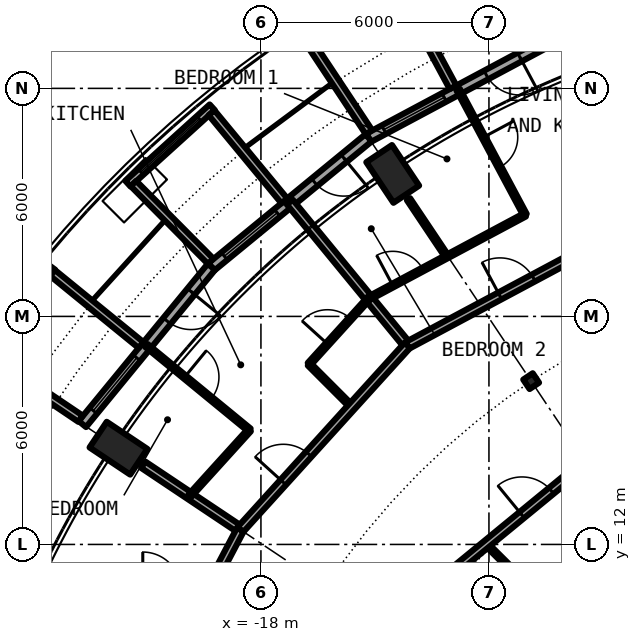
"""IFC4 building model, lengths in metres.
Left out: names, types, materials, properties, quantities, classifications, styles, units other than length and angle.
Written with IfcOpenShell. Run it as: python <this file> out.ifc"""

import sys

from ifc_helpers import new_model, si_unit, direction, frame, frame_2d, origin, origin_2d, place, context, subcontext, project, spatial, rectangle, circle, hollow_circle, i_section, extrude, element, fill, save


model = new_model("IFC4")
c1 = context("Model", 3, precision=1e-05, world=origin(), true_north=direction((0.0, 1.0)))
c2 = subcontext(c1, "Body", "Model", "MODEL_VIEW")
j1 = project(units=[si_unit("LENGTHUNIT", "METRE"), si_unit("PLANEANGLEUNIT", "RADIAN")], contexts=[c1])
p1 = place(None, origin())
s1 = spatial("IfcSite", under=j1, at=p1, CompositionType="ELEMENT")
p2 = place(p1, origin())
s2 = spatial("IfcBuilding", under=s1, at=p2, CompositionType="ELEMENT")
p3 = place(p2, frame((0.0, 0.0, 234.05)))
s3 = spatial("IfcBuildingStorey", under=s2, at=p3, CompositionType="ELEMENT", Elevation=234.05)
for number, where, z_axis, x_axis in (
    (1, (-14.889, 22.283, 0.0), (0.232, -0.347, 0.909), (0.831, 0.556, 0.0)),
    (2, (-22.283, 14.889, 0.0), (0.347, -0.232, 0.909), (0.556, 0.831, 0.0)),
):
    element("IfcColumn", number, at=place(p3, frame(where, z_axis=z_axis, x_axis=x_axis)), inside=s3, PredefinedType="COLUMN", context=c2, shape_type="SweptSolid", body=[
        extrude(hollow_circle(Radius=0.406, WallThickness=0.03, at=origin_2d()), origin(), (0.0, 0.0, 1.0), 3.081),
    ])
p4 = place(p3, frame((-10.889, 16.297, 0.0), z_axis=(0.0, 0.0, 1.0), x_axis=(-0.55557023302, 0.831469612303, 0.0)))
e3 = element("IfcColumn", 3, at=p4, inside=s3, PredefinedType="COLUMN", context=c2, shape_type="SweptSolid", body=[
    extrude(i_section(OverallWidth=0.3, OverallDepth=0.3, WebThickness=0.011, FlangeThickness=0.019, FilletRadius=0.027, at=origin_2d()), origin(), (0.0, 0.0, 1.0), 3.05),
])
p5 = place(p3, frame((-10.447, 25.222, 0.0), z_axis=(0.0, 0.0, 1.0), x_axis=(-0.881915646801, -0.471407246368, 0.0)))
e4 = element("IfcWall", 4, at=p5, inside=s3, PredefinedType="SOLIDWALL", context=c2, shape_type="SweptSolid", body=[
    extrude(rectangle(XDim=5.352, YDim=0.25, at=frame_2d((2.676, 0.0))), origin(), (0.0, 0.0, 1.0), 2.7),
])
p6 = place(p5, frame((0.841, 0.0, 0.0)))
e5 = element("IfcOpeningElement", 5, at=p6, cuts=e4, PredefinedType="OPENING", context=c2, shape_type="SweptSolid", body=[
    extrude(rectangle(XDim=1.0, YDim=2.2, at=frame_2d((0.5, 1.1))), frame((0.0, 0.135, 0.0), z_axis=(0.0, -1.0, 0.0), x_axis=(1.0, 0.0, 0.0)), (0.0, 0.0, 1.0), 0.27),
])
p7 = place(p5, frame((3.096, 0.0, 0.3)))
e6 = element("IfcOpeningElement", 6, at=p7, cuts=e4, PredefinedType="OPENING", context=c2, shape_type="SweptSolid", body=[
    extrude(rectangle(XDim=1.8, YDim=2.1, at=frame_2d((0.9, 1.05))), frame((0.0, 0.135, 0.0), z_axis=(0.0, -1.0, 0.0), x_axis=(1.0, 0.0, 0.0)), (0.0, 0.0, 1.0), 0.27),
])
p8 = place(p3, frame((-12.945, 24.029, -0.03), z_axis=(0.0, 0.0, 1.0), x_axis=(-0.474424310775, 0.88029629861, 0.0)))
e7 = element("IfcWall", 7, at=p8, inside=s3, PredefinedType="SOLIDWALL", context=c2, shape_type="SweptSolid", body=[
    extrude(rectangle(XDim=3.006, YDim=0.2, at=frame_2d((1.503, 0.0))), origin(), (0.0, 0.0, 1.0), 2.73),
])
p9 = place(p3, frame((-15.157, 22.846, -0.03), z_axis=(0.0, 0.0, 1.0), x_axis=(-0.552529231086, 0.833493520548, 0.0)))
e8 = element("IfcWall", 8, at=p9, inside=s3, PredefinedType="SOLIDWALL", context=c2, shape_type="SweptSolid", body=[
    extrude(rectangle(XDim=2.883, YDim=0.2, at=frame_2d((1.441, 0.0))), origin(), (0.0, 0.0, 1.0), 2.73),
])
p10 = place(p3, frame((-15.167, 22.699, 0.0), z_axis=(0.0, 0.0, 1.0), x_axis=(-0.773019449054, -0.634382322723, 0.0)))
e9 = element("IfcWall", 9, at=p10, inside=s3, PredefinedType="SOLIDWALL", context=c2, shape_type="SweptSolid", body=[
    extrude(rectangle(XDim=5.352, YDim=0.25, at=frame_2d((2.676, 0.0))), origin(), (0.0, 0.0, 1.0), 2.7),
])
p11 = place(p10, frame((0.841, 0.0, 0.0)))
e10 = element("IfcOpeningElement", 10, at=p11, cuts=e9, PredefinedType="OPENING", context=c2, shape_type="SweptSolid", body=[
    extrude(rectangle(XDim=1.0, YDim=2.2, at=frame_2d((0.5, 1.1))), frame((0.0, 0.135, 0.0), z_axis=(0.0, -1.0, 0.0), x_axis=(1.0, 0.0, 0.0)), (0.0, 0.0, 1.0), 0.27),
])
p12 = place(p10, frame((3.111, 0.0, 0.3)))
e11 = element("IfcOpeningElement", 11, at=p12, cuts=e9, PredefinedType="OPENING", context=c2, shape_type="SweptSolid", body=[
    extrude(rectangle(XDim=1.8, YDim=2.1, at=frame_2d((0.9, 1.05))), frame((0.0, 0.135, 0.0), z_axis=(0.0, -1.0, 0.0), x_axis=(1.0, 0.0, 0.0)), (0.0, 0.0, 1.0), 0.27),
])
p13 = place(p3, frame((-19.282, 23.503, -0.03), z_axis=(0.0, 0.0, 1.0), x_axis=(-0.740998365753, -0.671506829416, 0.0)))
e12 = element("IfcWall", 12, at=p13, inside=s3, PredefinedType="SOLIDWALL", context=c2, shape_type="SweptSolid", body=[
    extrude(rectangle(XDim=2.993, YDim=0.2, at=frame_2d((1.497, 0.0))), origin(), (0.0, 0.0, 1.0), 2.73),
])
p14 = place(p13, frame((0.457, 0.0, 0.33)))
e13 = element("IfcOpeningElement", 13, at=p14, cuts=e12, PredefinedType="OPENING", context=c2, shape_type="SweptSolid", body=[
    extrude(circle(Radius=1.04, at=frame_2d((1.04, 1.04))), frame((0.0, 0.11, 0.0), z_axis=(0.0, -1.0, 0.0), x_axis=(1.0, 0.0, 0.0)), (0.0, 0.0, 1.0), 0.22),
])
p15 = place(p3, frame((-17.384, 21.041, -0.03), z_axis=(0.0, 0.0, 1.0), x_axis=(-0.63709551667, 0.770784861449, 0.0)))
e14 = element("IfcWall", 14, at=p15, inside=s3, PredefinedType="SOLIDWALL", context=c2, shape_type="SweptSolid", body=[
    extrude(rectangle(XDim=3.006, YDim=0.2, at=frame_2d((1.503, 0.0))), origin(), (0.0, 0.0, 1.0), 2.73),
])
p16 = place(p3, frame((-19.323, 19.45, -0.03), z_axis=(0.0, 0.0, 1.0), x_axis=(-0.704476739375, 0.709727076896, 0.0)))
e15 = element("IfcWall", 15, at=p16, inside=s3, PredefinedType="SOLIDWALL", context=c2, shape_type="SweptSolid", body=[
    extrude(rectangle(XDim=2.883, YDim=0.2, at=frame_2d((1.441, 0.0))), origin(), (0.0, 0.0, 1.0), 2.73),
])
p17 = place(p3, frame((-19.304, 19.304, 0.0), z_axis=(0.0, 0.0, 1.0), x_axis=(-0.634382322723, -0.773019449054, 0.0)))
e16 = element("IfcWall", 16, at=p17, inside=s3, PredefinedType="SOLIDWALL", context=c2, shape_type="SweptSolid", body=[
    extrude(rectangle(XDim=5.352, YDim=0.25, at=frame_2d((2.676, 0.0))), origin(), (0.0, 0.0, 1.0), 2.7),
])
p18 = place(p17, frame((0.841, 0.0, 0.0)))
e17 = element("IfcOpeningElement", 17, at=p18, cuts=e16, PredefinedType="OPENING", context=c2, shape_type="SweptSolid", body=[
    extrude(rectangle(XDim=1.0, YDim=2.2, at=frame_2d((0.5, 1.1))), frame((0.0, 0.135, 0.0), z_axis=(0.0, -1.0, 0.0), x_axis=(1.0, 0.0, 0.0)), (0.0, 0.0, 1.0), 0.27),
])
p19 = place(p17, frame((3.096, 0.0, 0.3)))
e18 = element("IfcOpeningElement", 18, at=p19, cuts=e16, PredefinedType="OPENING", context=c2, shape_type="SweptSolid", body=[
    extrude(rectangle(XDim=1.8, YDim=2.1, at=frame_2d((0.9, 1.05))), frame((0.0, 0.135, 0.0), z_axis=(0.0, -1.0, 0.0), x_axis=(1.0, 0.0, 0.0)), (0.0, 0.0, 1.0), 0.27),
])
p20 = place(p3, frame((-23.496, 19.289, -0.03), z_axis=(0.0, 0.0, 1.0), x_axis=(-0.595908005124, -0.803052706508, 0.0)))
e19 = element("IfcWall", 19, at=p20, inside=s3, PredefinedType="SOLIDWALL", context=c2, shape_type="SweptSolid", body=[
    extrude(rectangle(XDim=2.994, YDim=0.2, at=frame_2d((1.497, 0.0))), origin(), (0.0, 0.0, 1.0), 2.73),
])
p21 = place(p20, frame((0.457, 0.0, 0.33)))
e20 = element("IfcOpeningElement", 20, at=p21, cuts=e19, PredefinedType="OPENING", context=c2, shape_type="SweptSolid", body=[
    extrude(circle(Radius=1.04, at=frame_2d((1.04, 1.04))), frame((0.0, 0.11, 0.0), z_axis=(0.0, -1.0, 0.0), x_axis=(1.0, 0.0, 0.0)), (0.0, 0.0, 1.0), 0.22),
])
p22 = place(p3, frame((-21.155, 17.246, -0.03), z_axis=(0.0, 0.0, 1.0), x_axis=(-0.775338113639, 0.631546363729, 0.0)))
e21 = element("IfcWall", 21, at=p22, inside=s3, PredefinedType="SOLIDWALL", context=c2, shape_type="SweptSolid", body=[
    extrude(rectangle(XDim=3.005, YDim=0.2, at=frame_2d((1.502, 0.0))), origin(), (0.0, 0.0, 1.0), 2.73),
])
p23 = place(p3, frame((-22.746, 15.307, -0.03), z_axis=(0.0, 0.0, 1.0), x_axis=(-0.829448139117, 0.558583730979, 0.0)))
e22 = element("IfcWall", 22, at=p23, inside=s3, PredefinedType="SOLIDWALL", context=c2, shape_type="SweptSolid", body=[
    extrude(rectangle(XDim=2.883, YDim=0.2, at=frame_2d((1.441, 0.0))), origin(), (0.0, 0.0, 1.0), 2.73),
])
p24 = place(p3, frame((-21.097, 14.097, 0.0), z_axis=(0.0, 0.0, 1.0), x_axis=(0.831340764735, -0.555763018642, 0.0)))
e23 = element("IfcWall", 23, at=p24, inside=s3, PredefinedType="PARTITIONING", context=c2, shape_type="SweptSolid", body=[
    extrude(rectangle(XDim=3.073, YDim=0.2, at=frame_2d((1.537, 0.0))), origin(), (0.0, 0.0, 1.0), 2.7),
])
p25 = place(p3, frame((-21.012, 17.233, 0.0), z_axis=(0.0, 0.0, 1.0), x_axis=(0.773165322764, -0.634204528267, 0.0)))
e24 = element("IfcWall", 24, at=p25, inside=s3, PredefinedType="PARTITIONING", context=c2, shape_type="SweptSolid", body=[
    extrude(rectangle(XDim=3.505, YDim=0.1, at=frame_2d((1.752, 0.0))), origin(), (0.0, 0.0, 1.0), 2.7),
])
p26 = place(p25, frame((1.303, 0.0, 0.0)))
e25 = element("IfcOpeningElement", 25, at=p26, cuts=e24, PredefinedType="OPENING", context=c2, shape_type="SweptSolid", body=[
    extrude(rectangle(XDim=0.9, YDim=2.3, at=frame_2d((0.45, 1.15))), frame((0.0, 0.06, 0.0), z_axis=(0.0, -1.0, 0.0), x_axis=(1.0, 0.0, 0.0)), (0.0, 0.0, 1.0), 0.12),
])
p27 = place(p3, frame((-17.24, 21.007, 0.0), z_axis=(0.0, 0.0, 1.0), x_axis=(0.634374159378, -0.773026148273, 0.0)))
e26 = element("IfcWall", 26, at=p27, inside=s3, PredefinedType="PARTITIONING", context=c2, shape_type="SweptSolid", body=[
    extrude(rectangle(XDim=4.876, YDim=0.2, at=frame_2d((2.438, 0.0))), origin(), (0.0, 0.0, 1.0), 2.7),
])
p28 = place(p3, frame((-16.732, 16.743, 0.0), z_axis=(0.0, 0.0, 1.0), x_axis=(0.70679853939, -0.707414888673, 0.0)))
e27 = element("IfcWall", 27, at=p28, inside=s3, PredefinedType="PARTITIONING", context=c2, shape_type="SweptSolid", body=[
    extrude(rectangle(XDim=1.584, YDim=0.1, at=frame_2d((0.792, 0.0))), origin(), (0.0, 0.0, 1.0), 2.7),
])
p29 = place(p3, frame((-14.117, 21.084, 0.0), z_axis=(0.0, 0.0, 1.0), x_axis=(0.556342315305, -0.830953204579, 0.0)))
e28 = element("IfcWall", 28, at=p29, inside=s3, PredefinedType="PARTITIONING", context=c2, shape_type="SweptSolid", body=[
    extrude(rectangle(XDim=1.817, YDim=0.1, at=frame_2d((0.909, 0.0))), origin(), (0.0, 0.0, 1.0), 2.7),
])
p30 = place(p3, frame((-12.81, 23.966, 0.0), z_axis=(0.0, 0.0, 1.0), x_axis=(0.471372010014, -0.881934480659, 0.0)))
e29 = element("IfcWall", 29, at=p30, inside=s3, PredefinedType="PARTITIONING", context=c2, shape_type="SweptSolid", body=[
    extrude(rectangle(XDim=3.734, YDim=0.1, at=frame_2d((1.867, 0.0))), origin(), (0.0, 0.0, 1.0), 2.7),
])
p31 = place(p30, frame((1.417, 0.0, 0.0)))
e30 = element("IfcOpeningElement", 30, at=p31, cuts=e29, PredefinedType="OPENING", context=c2, shape_type="SweptSolid", body=[
    extrude(rectangle(XDim=0.9, YDim=2.3, at=frame_2d((0.45, 1.15))), frame((0.0, 0.06, 0.0), z_axis=(0.0, -1.0, 0.0), x_axis=(1.0, 0.0, 0.0)), (0.0, 0.0, 1.0), 0.12),
])
p32 = place(p3, frame((-12.069, 12.007, 0.0), z_axis=(0.0, 0.0, 1.0), x_axis=(0.708851268309, -0.705357979622, 0.0)))
e31 = element("IfcWall", 31, at=p32, inside=s3, PredefinedType="PARTITIONING", context=c2, shape_type="SweptSolid", body=[
    extrude(rectangle(XDim=4.263, YDim=0.1, at=frame_2d((2.132, 0.0))), origin(), (0.0, 0.0, 1.0), 2.7),
])
p33 = place(p32, frame((1.682, 0.0, 0.0)))
e32 = element("IfcOpeningElement", 32, at=p33, cuts=e31, PredefinedType="OPENING", context=c2, shape_type="SweptSolid", body=[
    extrude(rectangle(XDim=0.9, YDim=2.3, at=frame_2d((0.45, 1.15))), frame((0.0, 0.06, 0.0), z_axis=(0.0, -1.0, 0.0), x_axis=(1.0, 0.0, 0.0)), (0.0, 0.0, 1.0), 0.12),
])
p34 = place(p3, frame((-14.717, 9.834, 0.0), z_axis=(0.0, 0.0, 1.0), x_axis=(0.773034536097, 0.634363938131, 0.0)))
e33 = element("IfcWall", 33, at=p34, inside=s3, PredefinedType="PARTITIONING", context=c2, shape_type="SweptSolid", body=[
    extrude(rectangle(XDim=10.277, YDim=0.2, at=frame_2d((5.138, 0.0))), origin(), (0.0, 0.0, 1.0), 2.7),
])
p35 = place(p34, frame((4.638, 0.0, 0.0)))
e34 = element("IfcOpeningElement", 34, at=p35, cuts=e33, PredefinedType="OPENING", context=c2, shape_type="SweptSolid", body=[
    extrude(rectangle(XDim=1.0, YDim=2.3, at=frame_2d((0.5, 1.15))), frame((0.0, 0.11, 0.0), z_axis=(0.0, -1.0, 0.0), x_axis=(1.0, 0.0, 0.0)), (0.0, 0.0, 1.0), 0.22),
])
p36 = place(p3, frame((-14.149, 17.236, 0.0), z_axis=(0.0, 0.0, 1.0), x_axis=(0.881869539497, 0.471493494448, 0.0)))
e35 = element("IfcWall", 35, at=p36, inside=s3, PredefinedType="PARTITIONING", context=c2, shape_type="SweptSolid", body=[
    extrude(rectangle(XDim=8.704, YDim=0.2, at=frame_2d((4.352, 0.0))), origin(), (0.0, 0.0, 1.0), 2.7),
])
p37 = place(p36, frame((2.765, 0.0, 0.0)))
e36 = element("IfcOpeningElement", 36, at=p37, cuts=e35, PredefinedType="OPENING", context=c2, shape_type="SweptSolid", body=[
    extrude(rectangle(XDim=1.0, YDim=2.3, at=frame_2d((0.5, 1.15))), frame((0.0, 0.11, 0.0), z_axis=(0.0, -1.0, 0.0), x_axis=(1.0, 0.0, 0.0)), (0.0, 0.0, 1.0), 0.22),
])
p38 = place(p3, frame((-18.542, 12.389, 0.0), z_axis=(0.0, 0.0, 1.0), x_axis=(0.671561669125, 0.740948665268, 0.0)))
e37 = element("IfcWall", 37, at=p38, inside=s3, PredefinedType="PARTITIONING", context=c2, shape_type="SweptSolid", body=[
    extrude(rectangle(XDim=6.544, YDim=0.2, at=frame_2d((3.272, 0.0))), origin(), (0.0, 0.0, 1.0), 2.7),
])
p39 = place(p38, frame((1.682, 0.0, 0.0)))
e38 = element("IfcOpeningElement", 38, at=p39, cuts=e37, PredefinedType="OPENING", context=c2, shape_type="SweptSolid", body=[
    extrude(rectangle(XDim=1.0, YDim=2.3, at=frame_2d((0.5, 1.15))), frame((0.0, 0.11, 0.0), z_axis=(0.0, -1.0, 0.0), x_axis=(1.0, 0.0, 0.0)), (0.0, 0.0, 1.0), 0.22),
])
p40 = place(p3, frame((-19.328, 10.896, 0.0), z_axis=(0.0, 0.0, 1.0), x_axis=(0.465812036273, 0.88488369115, 0.0)))
e39 = element("IfcWall", 39, at=p40, inside=s3, PredefinedType="PARTITIONING", context=c2, shape_type="SweptSolid", body=[
    extrude(rectangle(XDim=1.687, YDim=0.2, at=frame_2d((0.844, 0.0))), origin(), (0.0, 0.0, 1.0), 2.7),
])
p41 = place(p3, frame((-15.162, 18.475, 0.0), z_axis=(0.0, 0.0, 1.0), x_axis=(0.881916280728, 0.471406060405, 0.0)))
e40 = element("IfcWall", 40, at=p41, inside=s3, PredefinedType="PARTITIONING", context=c2, shape_type="SweptSolid", body=[
    extrude(rectangle(XDim=4.663, YDim=0.1, at=frame_2d((2.331, 0.0))), origin(), (0.0, 0.0, 1.0), 2.7),
])
p42 = place(p41, frame((0.716, 0.0, 0.0)))
e41 = element("IfcOpeningElement", 41, at=p42, cuts=e40, PredefinedType="OPENING", context=c2, shape_type="SweptSolid", body=[
    extrude(rectangle(XDim=0.9, YDim=2.3, at=frame_2d((0.45, 1.15))), frame((0.0, 0.06, 0.0), z_axis=(0.0, -1.0, 0.0), x_axis=(1.0, 0.0, 0.0)), (0.0, 0.0, 1.0), 0.12),
])
p43 = place(p3, frame((-19.872, 13.278, 0.0), z_axis=(0.0, 0.0, 1.0), x_axis=(0.671637685376, 0.740879760544, 0.0)))
e42 = element("IfcWall", 42, at=p43, inside=s3, PredefinedType="PARTITIONING", context=c2, shape_type="SweptSolid", body=[
    extrude(rectangle(XDim=2.338, YDim=0.1, at=frame_2d((1.169, 0.0))), origin(), (0.0, 0.0, 1.0), 2.7),
])
p44 = place(p3, frame((-16.732, 16.743, 0.0), z_axis=(0.0, 0.0, 1.0), x_axis=(0.671528384412, 0.740978831634, 0.0)))
e43 = element("IfcWall", 43, at=p44, inside=s3, PredefinedType="PARTITIONING", context=c2, shape_type="SweptSolid", body=[
    extrude(rectangle(XDim=2.338, YDim=0.1, at=frame_2d((1.169, 0.0))), origin(), (0.0, 0.0, 1.0), 2.7),
])
p45 = place(p44, frame((0.719, 0.0, 0.0)))
e44 = element("IfcOpeningElement", 44, at=p45, cuts=e43, PredefinedType="OPENING", context=c2, shape_type="SweptSolid", body=[
    extrude(rectangle(XDim=0.9, YDim=2.3, at=frame_2d((0.45, 1.15))), frame((0.0, 0.06, 0.0), z_axis=(0.0, -1.0, 0.0), x_axis=(1.0, 0.0, 0.0)), (0.0, 0.0, 1.0), 0.12),
])
p46 = place(p6, origin())
e45 = element("IfcDoor", 45, at=p46, inside=s3, OperationType="SINGLE_SWING_LEFT", PredefinedType="DOOR", context=c2, shape_type="SweptSolid", body=[
    extrude(rectangle(XDim=1.0, YDim=2.2, at=frame_2d((0.5, 1.1))), frame((0.0, 0.025, 0.0), z_axis=(0.0, -1.0, 0.0), x_axis=(1.0, 0.0, 0.0)), (0.0, 0.0, 1.0), 0.05),
])
fill(e5, e45)
p47 = place(p7, origin())
e46 = element("IfcWindow", 46, at=p47, inside=s3, PartitioningType="SINGLE_PANEL", PredefinedType="WINDOW", context=c2, shape_type="SweptSolid", body=[
    extrude(rectangle(XDim=1.8, YDim=2.1, at=frame_2d((0.9, 1.05))), frame((0.0, 0.03, 0.0), z_axis=(0.0, -1.0, 0.0), x_axis=(1.0, 0.0, 0.0)), (0.0, 0.0, 1.0), 0.06),
])
fill(e6, e46)
p48 = place(p11, origin())
e47 = element("IfcDoor", 47, at=p48, inside=s3, OperationType="SINGLE_SWING_LEFT", PredefinedType="DOOR", context=c2, shape_type="SweptSolid", body=[
    extrude(rectangle(XDim=1.0, YDim=2.2, at=frame_2d((0.5, 1.1))), frame((0.0, 0.025, 0.0), z_axis=(0.0, -1.0, 0.0), x_axis=(1.0, 0.0, 0.0)), (0.0, 0.0, 1.0), 0.05),
])
fill(e10, e47)
p49 = place(p12, origin())
e48 = element("IfcWindow", 48, at=p49, inside=s3, PartitioningType="SINGLE_PANEL", PredefinedType="WINDOW", context=c2, shape_type="SweptSolid", body=[
    extrude(rectangle(XDim=1.8, YDim=2.1, at=frame_2d((0.9, 1.05))), frame((0.0, 0.03, 0.0), z_axis=(0.0, -1.0, 0.0), x_axis=(1.0, 0.0, 0.0)), (0.0, 0.0, 1.0), 0.06),
])
fill(e11, e48)
p50 = place(p14, origin())
e49 = element("IfcWindow", 49, at=p50, inside=s3, PartitioningType="SINGLE_PANEL", PredefinedType="WINDOW", context=c2, shape_type="SweptSolid", body=[
    extrude(circle(Radius=1.04, at=frame_2d((1.04, 1.04))), frame((0.0, 0.03, 0.0), z_axis=(0.0, -1.0, 0.0), x_axis=(1.0, 0.0, 0.0)), (0.0, 0.0, 1.0), 0.06),
])
fill(e13, e49)
p51 = place(p18, origin())
e50 = element("IfcDoor", 50, at=p51, inside=s3, OperationType="SINGLE_SWING_LEFT", PredefinedType="DOOR", context=c2, shape_type="SweptSolid", body=[
    extrude(rectangle(XDim=1.0, YDim=2.2, at=frame_2d((0.5, 1.1))), frame((0.0, 0.025, 0.0), z_axis=(0.0, -1.0, 0.0), x_axis=(1.0, 0.0, 0.0)), (0.0, 0.0, 1.0), 0.05),
])
fill(e17, e50)
p52 = place(p19, origin())
e51 = element("IfcWindow", 51, at=p52, inside=s3, PartitioningType="SINGLE_PANEL", PredefinedType="WINDOW", context=c2, shape_type="SweptSolid", body=[
    extrude(rectangle(XDim=1.8, YDim=2.1, at=frame_2d((0.9, 1.05))), frame((0.0, 0.03, 0.0), z_axis=(0.0, -1.0, 0.0), x_axis=(1.0, 0.0, 0.0)), (0.0, 0.0, 1.0), 0.06),
])
fill(e18, e51)
p53 = place(p37, origin())
e52 = element("IfcDoor", 52, at=p53, inside=s3, OperationType="SINGLE_SWING_LEFT", PredefinedType="DOOR", context=c2, shape_type="SweptSolid", body=[
    extrude(rectangle(XDim=1.0, YDim=2.3, at=frame_2d((0.5, 1.15))), frame((0.0, 0.025, 0.0), z_axis=(0.0, -1.0, 0.0), x_axis=(1.0, 0.0, 0.0)), (0.0, 0.0, 1.0), 0.05),
])
fill(e36, e52)
p54 = place(p31, origin())
e53 = element("IfcDoor", 53, at=p54, inside=s3, OperationType="SINGLE_SWING_RIGHT", PredefinedType="DOOR", context=c2, shape_type="SweptSolid", body=[
    extrude(rectangle(XDim=0.9, YDim=2.3, at=frame_2d((0.45, 1.15))), frame((0.0, 0.025, 0.0), z_axis=(0.0, -1.0, 0.0), x_axis=(1.0, 0.0, 0.0)), (0.0, 0.0, 1.0), 0.05),
])
fill(e30, e53)
p55 = place(p42, origin())
e54 = element("IfcDoor", 54, at=p55, inside=s3, OperationType="SINGLE_SWING_LEFT", PredefinedType="DOOR", context=c2, shape_type="SweptSolid", body=[
    extrude(rectangle(XDim=0.9, YDim=2.3, at=frame_2d((0.45, 1.15))), frame((0.0, 0.025, 0.0), z_axis=(0.0, -1.0, 0.0), x_axis=(1.0, 0.0, 0.0)), (0.0, 0.0, 1.0), 0.05),
])
fill(e41, e54)
p56 = place(p39, origin())
e55 = element("IfcDoor", 55, at=p56, inside=s3, OperationType="SINGLE_SWING_LEFT", PredefinedType="DOOR", context=c2, shape_type="SweptSolid", body=[
    extrude(rectangle(XDim=1.0, YDim=2.3, at=frame_2d((0.5, 1.15))), frame((0.0, 0.025, 0.0), z_axis=(0.0, -1.0, 0.0), x_axis=(1.0, 0.0, 0.0)), (0.0, 0.0, 1.0), 0.05),
])
fill(e38, e55)
p57 = place(p45, origin())
e56 = element("IfcDoor", 56, at=p57, inside=s3, OperationType="SINGLE_SWING_LEFT", PredefinedType="DOOR", context=c2, shape_type="SweptSolid", body=[
    extrude(rectangle(XDim=0.9, YDim=2.3, at=frame_2d((0.45, 1.15))), frame((0.0, 0.025, 0.0), z_axis=(0.0, -1.0, 0.0), x_axis=(1.0, 0.0, 0.0)), (0.0, 0.0, 1.0), 0.05),
])
fill(e44, e56)
p58 = place(p26, origin())
e57 = element("IfcDoor", 57, at=p58, inside=s3, OperationType="SINGLE_SWING_LEFT", PredefinedType="DOOR", context=c2, shape_type="SweptSolid", body=[
    extrude(rectangle(XDim=0.9, YDim=2.3, at=frame_2d((0.45, 1.15))), frame((0.0, 0.025, 0.0), z_axis=(0.0, -1.0, 0.0), x_axis=(1.0, 0.0, 0.0)), (0.0, 0.0, 1.0), 0.05),
])
fill(e25, e57)
p59 = place(p35, origin())
e58 = element("IfcDoor", 58, at=p59, inside=s3, OperationType="SINGLE_SWING_LEFT", PredefinedType="DOOR", context=c2, shape_type="SweptSolid", body=[
    extrude(rectangle(XDim=1.0, YDim=2.3, at=frame_2d((0.5, 1.15))), frame((0.0, 0.025, 0.0), z_axis=(0.0, -1.0, 0.0), x_axis=(1.0, 0.0, 0.0)), (0.0, 0.0, 1.0), 0.05),
])
fill(e34, e58)
save(model, sys.argv[1])
